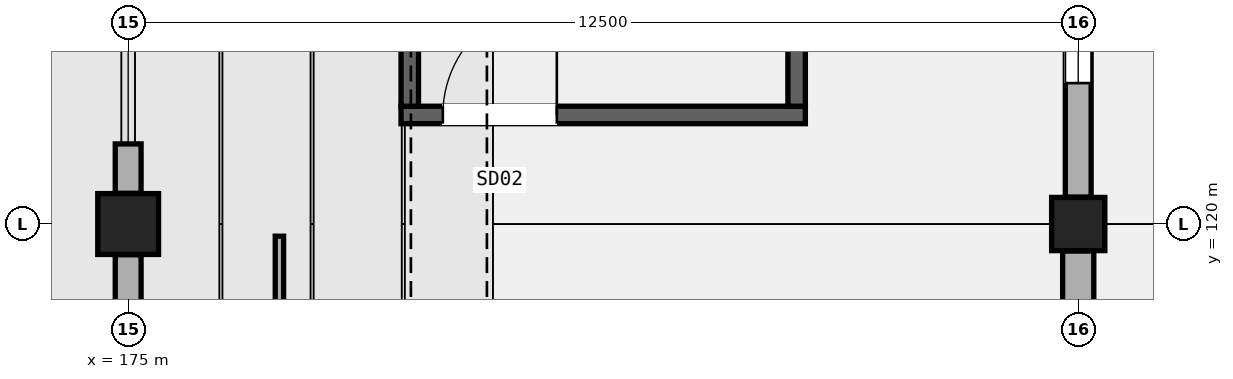
"""IFC4 building model, lengths in metres.
Left out: names, types, materials, properties, quantities, classifications, styles, units other than length and angle.
Written with IfcOpenShell. Run it as: python <this file> out.ifc"""

import sys

from ifc_helpers import new_model, si_unit, direction, frame, frame_2d, origin, origin_2d, place, context, subcontext, project, spatial, rectangle, extrude, element, fill, save


model = new_model("IFC4")
c1 = context("Model", 3, precision=1e-05, world=origin(), true_north=direction((0.0, 1.0)))
c2 = subcontext(c1, "Body", "Model", "MODEL_VIEW")
j1 = project(units=[si_unit("LENGTHUNIT", "METRE"), si_unit("PLANEANGLEUNIT", "RADIAN")], contexts=[c1])
p1 = place(None, origin())
s1 = spatial("IfcSite", under=j1, at=p1, CompositionType="ELEMENT")
p2 = place(p1, origin())
s2 = spatial("IfcBuilding", under=s1, at=p2, CompositionType="ELEMENT")
p3 = place(p2, frame((0.0, 0.0, 15.3)))
s3 = spatial("IfcBuildingStorey", under=s2, at=p3, CompositionType="ELEMENT", Elevation=15.3)
p4 = place(p3, frame((175.0, 120.0, 0.0), z_axis=(0.0, 0.0, 1.0), x_axis=(1.0, 0.0, 0.0)))
e1 = element("IfcColumn", 1, at=p4, inside=s3, PredefinedType="COLUMN", context=c2, shape_type="SweptSolid", body=[
    extrude(rectangle(XDim=0.8, YDim=0.8, at=origin_2d()), origin(), (0.0, 0.0, 1.0), 5.1),
])
p5 = place(p3, frame((187.5, 120.0, 0.0), z_axis=(0.0, 0.0, 1.0), x_axis=(1.0, 0.0, 0.0)))
e2 = element("IfcColumn", 2, at=p5, inside=s3, PredefinedType="COLUMN", context=c2, shape_type="SweptSolid", body=[
    extrude(rectangle(XDim=0.7, YDim=0.7, at=origin_2d()), origin(), (0.0, 0.0, 1.0), 5.1),
])
p6 = place(p3, frame((175.0, 118.946, 0.0), z_axis=(0.0, 0.0, 1.0), x_axis=(0.0, 1.0, 0.0)))
e3 = element("IfcWall", 3, at=p6, inside=s3, PredefinedType="SOLIDWALL", context=c2, shape_type="SweptSolid", body=[
    extrude(rectangle(XDim=0.65, YDim=0.34, at=frame_2d((0.325, 0.0))), origin(), (0.0, 0.0, 1.0), 4.172),
])
p7 = place(p3, frame((187.5, 108.404, 0.0), z_axis=(0.0, 0.0, 1.0), x_axis=(0.0, 1.0, 0.0)))
e4 = element("IfcWall", 4, at=p7, inside=s3, PredefinedType="SOLIDWALL", context=c2, shape_type="SweptSolid", body=[
    extrude(rectangle(XDim=11.242, YDim=0.41, at=frame_2d((5.621, 0.0))), origin(), (0.0, 0.0, 1.0), 4.06),
])
p8 = place(p7, frame((1.5, 0.0, 0.95)))
e5 = element("IfcOpeningElement", 5, at=p8, cuts=e4, PredefinedType="OPENING", context=c2, shape_type="SweptSolid", body=[
    extrude(rectangle(XDim=2.7, YDim=2.2, at=frame_2d((1.35, 1.1))), frame((0.0, 0.215, 0.0), z_axis=(0.0, -1.0, 0.0), x_axis=(1.0, 0.0, 0.0)), (0.0, 0.0, 1.0), 0.43),
])
p9 = place(p3, frame((175.0, 120.404, 0.0), z_axis=(0.0, 0.0, 1.0), x_axis=(0.0, 1.0, 0.0)))
e6 = element("IfcWall", 6, at=p9, inside=s3, PredefinedType="SOLIDWALL", context=c2, shape_type="SweptSolid", body=[
    extrude(rectangle(XDim=0.65, YDim=0.34, at=frame_2d((0.325, 0.0))), origin(), (0.0, 0.0, 1.0), 4.06),
])
p10 = place(p3, frame((187.5, 120.354, 0.0), z_axis=(0.0, 0.0, 1.0), x_axis=(0.0, 1.0, 0.0)))
e7 = element("IfcWall", 7, at=p10, inside=s3, PredefinedType="SOLIDWALL", context=c2, shape_type="SweptSolid", body=[
    extrude(rectangle(XDim=11.442, YDim=0.34, at=frame_2d((5.721, 0.0))), origin(), (0.0, 0.0, 1.0), 4.16),
])
p11 = place(p10, frame((1.5, 0.0, 0.95)))
e8 = element("IfcOpeningElement", 8, at=p11, cuts=e7, PredefinedType="OPENING", context=c2, shape_type="SweptSolid", body=[
    extrude(rectangle(XDim=2.85, YDim=2.0, at=frame_2d((1.425, 1.0))), frame((0.0, 0.18, 0.0), z_axis=(0.0, -1.0, 0.0), x_axis=(1.0, 0.0, 0.0)), (0.0, 0.0, 1.0), 0.36),
])
p12 = place(p3, frame((178.59, 121.435, 0.0), z_axis=(0.0, 0.0, 1.0), x_axis=(1.0, 0.0, 0.0)))
e9 = element("IfcWall", 9, at=p12, inside=s3, PredefinedType="SHEAR", context=c2, shape_type="SweptSolid", body=[
    extrude(rectangle(XDim=5.32, YDim=0.23, at=frame_2d((2.66, 0.0))), origin(), (0.0, 0.0, 1.0), 4.86),
])
p13 = place(p12, frame((0.55, 0.0, 0.0)))
e10 = element("IfcOpeningElement", 10, at=p13, cuts=e9, PredefinedType="OPENING", context=c2, shape_type="SweptSolid", body=[
    extrude(rectangle(XDim=1.5, YDim=2.2, at=frame_2d((0.75, 1.1))), frame((0.0, 0.125, 0.0), z_axis=(0.0, -1.0, 0.0), x_axis=(1.0, 0.0, 0.0)), (0.0, 0.0, 1.0), 0.25),
])
for number, where, z_axis, x_axis in (
    (11, (178.705, 121.55, 0.0), (0.0, 0.0, 1.0), (0.0, 1.0, 0.0)),
    (12, (183.795, 121.55, 0.0), (0.0, 0.0, 1.0), (0.0, 1.0, 0.0)),
):
    element("IfcWall", number, at=place(p3, frame(where, z_axis=z_axis, x_axis=x_axis)), inside=s3, PredefinedType="SHEAR", context=c2, shape_type="SweptSolid", body=[
        extrude(rectangle(XDim=8.9, YDim=0.23, at=frame_2d((4.45, 0.0))), origin(), (0.0, 0.0, 1.0), 4.86),
    ])
p14 = place(p3, frame((176.99, 108.16, 0.0), z_axis=(0.0, 0.0, 1.0), x_axis=(0.0, 1.0, 0.0)))
e13 = element("IfcWall", 13, at=p14, inside=s3, PredefinedType="PARTITIONING", context=c2, shape_type="SweptSolid", body=[
    extrude(rectangle(XDim=11.68, YDim=0.11, at=frame_2d((5.84, 0.0))), origin(), (0.0, 0.0, 1.0), 2.77),
])
p15 = place(p14, frame((6.43, 0.0, 0.0), z_axis=(0.0, 0.0, 1.0), x_axis=(-1.0, 0.0, 0.0)))
e14 = element("IfcOpeningElement", 14, at=p15, cuts=e13, PredefinedType="OPENING", context=c2, shape_type="SweptSolid", body=[
    extrude(rectangle(XDim=1.18, YDim=2.2, at=frame_2d((0.59, 1.1))), frame((0.0, 0.065, 0.0), z_axis=(0.0, -1.0, 0.0), x_axis=(1.0, 0.0, 0.0)), (0.0, 0.0, 1.0), 0.13),
])
p16 = place(p11, origin())
e15 = element("IfcWindow", 15, at=p16, inside=s3, PartitioningType="SINGLE_PANEL", PredefinedType="WINDOW", context=c2, shape_type="SweptSolid", body=[
    extrude(rectangle(XDim=2.85, YDim=2.0, at=frame_2d((1.425, 1.0))), frame((0.0, 0.03, 0.0), z_axis=(0.0, -1.0, 0.0), x_axis=(1.0, 0.0, 0.0)), (0.0, 0.0, 1.0), 0.06),
])
fill(e8, e15)
p17 = place(p13, origin())
e16 = element("IfcDoor", 16, at=p17, inside=s3, OperationType="SINGLE_SWING_RIGHT", PredefinedType="DOOR", context=c2, shape_type="SweptSolid", body=[
    extrude(rectangle(XDim=1.5, YDim=2.2, at=frame_2d((0.75, 1.1))), frame((0.0, 0.025, 0.0), z_axis=(0.0, -1.0, 0.0), x_axis=(1.0, 0.0, 0.0)), (0.0, 0.0, 1.0), 0.05),
])
fill(e10, e16)
save(model, sys.argv[1])
